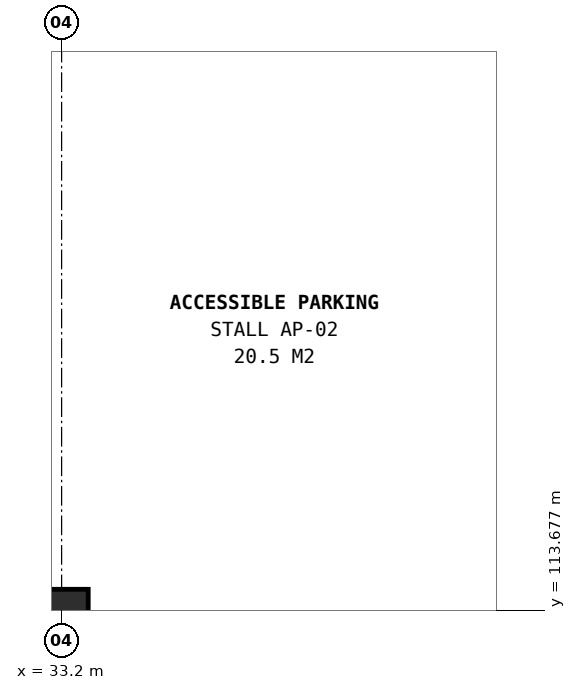
"""IFC4 building model, lengths in metres.
Left out: names, types, materials, properties, quantities, classifications, styles, units other than length and angle.
Written with IfcOpenShell. Run it as: python <this file> out.ifc"""

import sys

from ifc_helpers import new_model, si_unit, direction, frame, origin, origin_2d, place, context, subcontext, project, spatial, rectangle, extrude, element, save


model = new_model("IFC4")
c1 = context("Model", 3, precision=1e-05, world=origin(), true_north=direction((0.0, 1.0)))
c2 = subcontext(c1, "Body", "Model", "MODEL_VIEW")
j1 = project(units=[si_unit("LENGTHUNIT", "METRE"), si_unit("PLANEANGLEUNIT", "RADIAN")], contexts=[c1])
p1 = place(None, origin())
s1 = spatial("IfcSite", under=j1, at=p1, CompositionType="ELEMENT")
p2 = place(p1, origin())
s2 = spatial("IfcBuilding", under=s1, at=p2, CompositionType="ELEMENT")
p3 = place(p2, frame((0.0, 0.0, -4.5)))
s3 = spatial("IfcBuildingStorey", under=s2, at=p3, CompositionType="ELEMENT", Elevation=-4.5)
p4 = place(p3, frame((33.2, 113.6, 0.0), z_axis=(0.0, 0.0, 1.0), x_axis=(1.0, 0.0, 0.0)))
e1 = element("IfcColumn", 1, at=p4, inside=s3, PredefinedType="COLUMN", context=c2, shape_type="SweptSolid", body=[
    extrude(rectangle(XDim=0.7, YDim=0.7, at=origin_2d()), origin(), (0.0, 0.0, 1.0), 4.5),
])
save(model, sys.argv[1])
